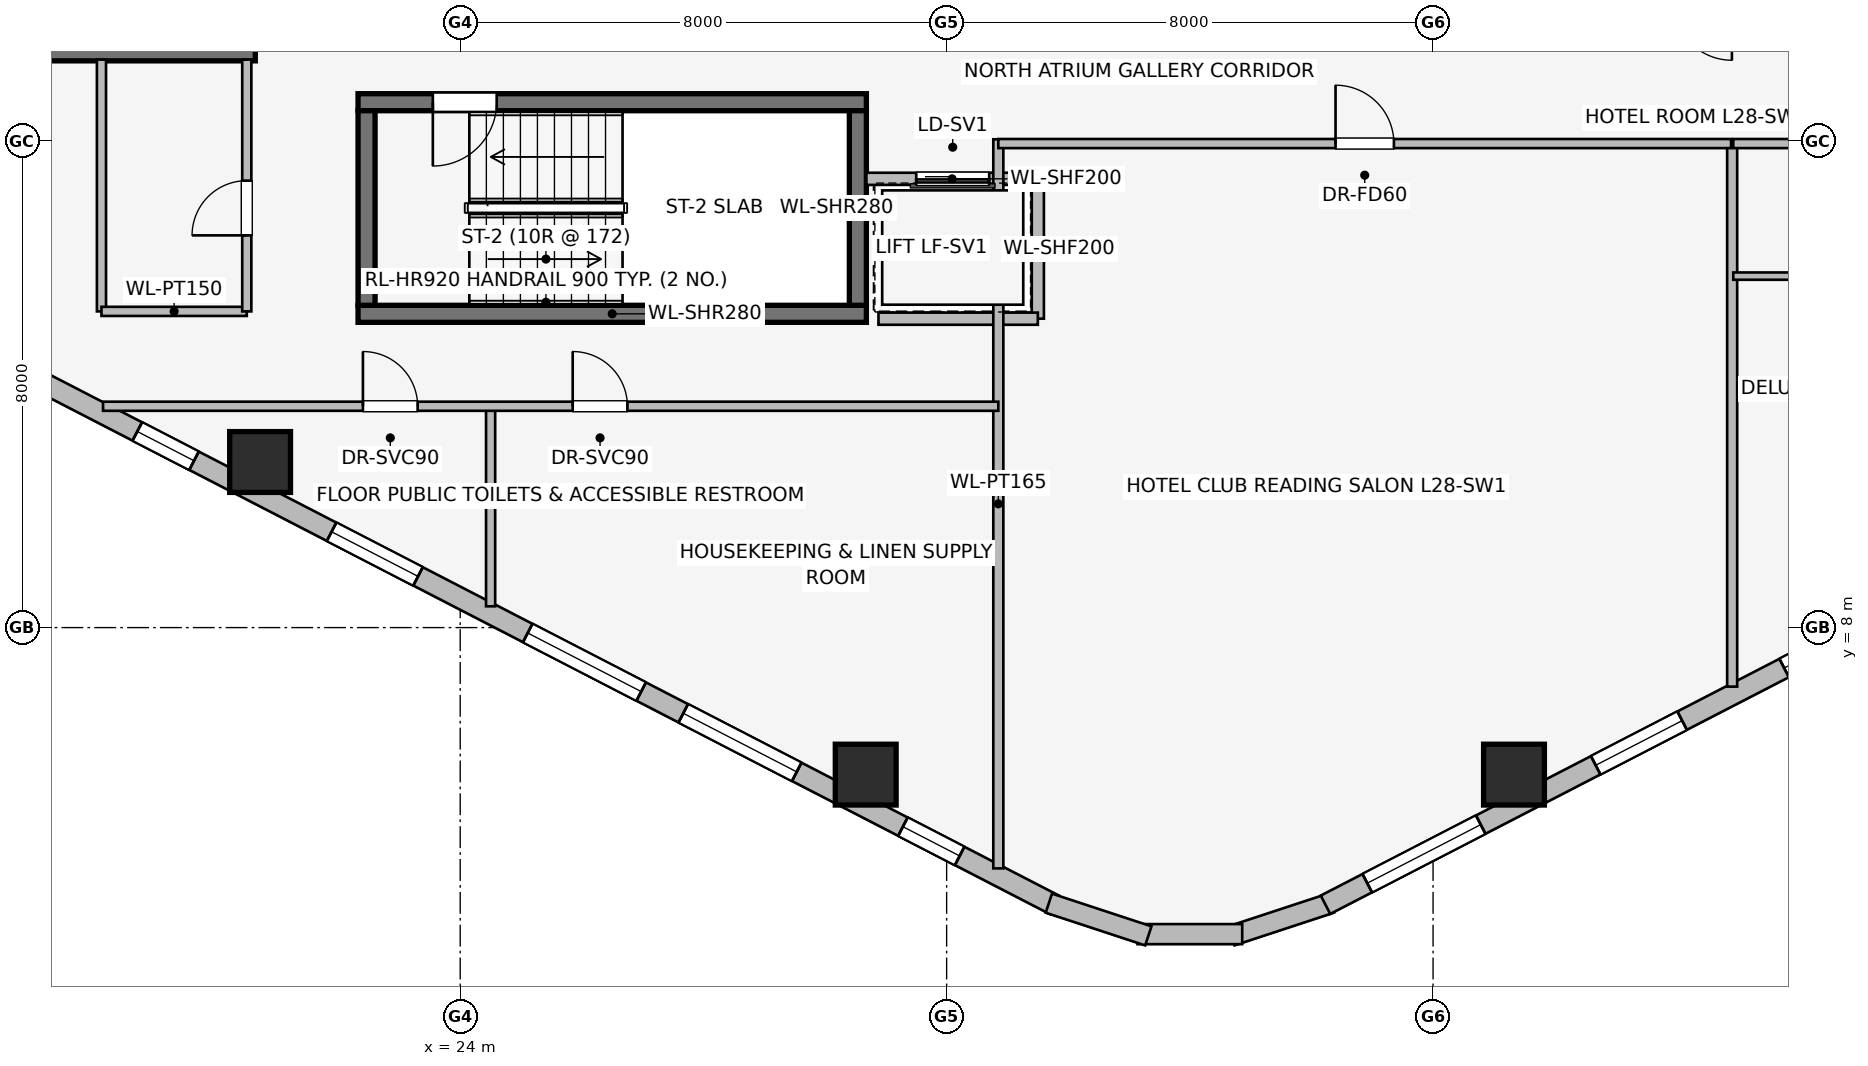
"""IFC4 building model, lengths in metres.
Left out: names, types, materials, properties, quantities, classifications, styles, units other than length and angle.
Written with IfcOpenShell. Run it as: python <this file> out.ifc"""

import sys

from ifc_helpers import new_model, si_unit, direction, frame, frame_2d, origin, origin_2d, place, context, subcontext, project, spatial, rectangle, extrude, element, fill, save


model = new_model("IFC4")
c1 = context("Model", 3, precision=1e-05, world=origin(), true_north=direction((0.0, 1.0)))
c2 = subcontext(c1, "Body", "Model", "MODEL_VIEW")
j1 = project(units=[si_unit("LENGTHUNIT", "METRE"), si_unit("PLANEANGLEUNIT", "RADIAN")], contexts=[c1])
p1 = place(None, origin())
s1 = spatial("IfcSite", under=j1, at=p1, CompositionType="ELEMENT")
p2 = place(p1, origin())
s2 = spatial("IfcBuilding", under=s1, at=p2, CompositionType="ELEMENT")
p3 = place(p2, frame((0.0, 0.0, 108.45)))
s3 = spatial("IfcBuildingStorey", under=s2, at=p3, CompositionType="ELEMENT", Elevation=108.45)
p4 = place(p3, frame((16.87, 17.46, 0.0), z_axis=(0.0, 0.0, 1.0), x_axis=(1.0, 0.0, 0.0)))
e1 = element("IfcWall", 1, at=p4, inside=s3, PredefinedType="SHEAR", context=c2, shape_type="SweptSolid", body=[
    extrude(rectangle(XDim=3.76, YDim=0.28, at=frame_2d((1.88, 0.0))), origin(), (0.0, 0.0, 1.0), 3.45),
])
p5 = place(p3, frame((22.32, 13.16, 0.0), z_axis=(0.0, 0.0, 1.0), x_axis=(1.0, 0.0, 0.0)))
e2 = element("IfcWall", 2, at=p5, inside=s3, PredefinedType="SHEAR", context=c2, shape_type="SweptSolid", body=[
    extrude(rectangle(XDim=8.36, YDim=0.28, at=frame_2d((4.18, 0.0))), origin(), (0.0, 0.0, 1.0), 3.45),
])
p6 = place(p3, frame((30.68, 16.64, 0.0), z_axis=(0.0, 0.0, 1.0), x_axis=(-1.0, 0.0, 0.0)))
e3 = element("IfcWall", 3, at=p6, inside=s3, PredefinedType="SHEAR", context=c2, shape_type="SweptSolid", body=[
    extrude(rectangle(XDim=8.36, YDim=0.28, at=frame_2d((4.18, 0.0))), origin(), (0.0, 0.0, 1.0), 3.45),
])
p7 = place(p6, frame((6.08, 0.0, 0.0)))
e4 = element("IfcOpeningElement", 4, at=p7, cuts=e3, PredefinedType="OPENING", context=c2, shape_type="SweptSolid", body=[
    extrude(rectangle(XDim=1.05, YDim=2.0, at=frame_2d((0.525, 1.0))), frame((0.0, 0.15, 0.0), z_axis=(0.0, -1.0, 0.0), x_axis=(1.0, 0.0, 0.0)), (0.0, 0.0, 1.0), 0.3),
])
for number, where, z_axis, x_axis in (
    (5, (22.46, 16.5, 0.0), (0.0, 0.0, 1.0), (0.0, -1.0, 0.0)),
    (6, (30.54, 13.3, 0.0), (0.0, 0.0, 1.0), (0.0, 1.0, 0.0)),
):
    element("IfcWall", number, at=place(p3, frame(where, z_axis=z_axis, x_axis=x_axis)), inside=s3, PredefinedType="SHEAR", context=c2, shape_type="SweptSolid", body=[
        extrude(rectangle(XDim=3.2, YDim=0.28, at=frame_2d((1.6, 0.0))), origin(), (0.0, 0.0, 1.0), 3.45),
    ])
for number, where, z_axis, x_axis in (
    (7, (20.709, 10.723, 0.0), (0.0, 0.0, 1.0), (1.0, 0.0, 0.0)),
    (8, (30.669, 5.582, 0.0), (0.0, 0.0, 1.0), (1.0, 0.0, 0.0)),
    (9, (41.331, 5.582, 0.0), (0.0, 0.0, 1.0), (1.0, 0.0, 0.0)),
):
    element("IfcColumn", number, at=place(p3, frame(where, z_axis=z_axis, x_axis=x_axis)), inside=s3, PredefinedType="COLUMN", context=c2, shape_type="SweptSolid", body=[
        extrude(rectangle(XDim=1.0, YDim=1.0, at=origin_2d()), origin(), (0.0, 0.0, 1.0), 3.45),
    ])
p8 = place(p3, frame((17.243, 11.95, 0.0), z_axis=(0.0, 0.0, 1.0), x_axis=(-0.790621329885, 0.612305408053, 0.0)))
e10 = element("IfcWall", 10, at=p8, inside=s3, PredefinedType="STANDARD", context=c2, shape_type="SweptSolid", body=[
    extrude(rectangle(XDim=1.676, YDim=0.33, at=frame_2d((0.838, 0.0))), origin(), (0.0, 0.0, 1.0), 3.16),
])
p9 = place(p3, frame((33.769, 3.442, 0.0), z_axis=(0.0, 0.0, 1.0), x_axis=(-0.888613612362, 0.458656568606, 0.0)))
e11 = element("IfcWall", 11, at=p9, inside=s3, PredefinedType="STANDARD", context=c2, shape_type="SweptSolid", body=[
    extrude(rectangle(XDim=18.681, YDim=0.34, at=frame_2d((9.34, 0.0))), origin(), (0.0, 0.0, 1.0), 3.16),
])
p10 = place(p9, frame((1.75, 0.0, 0.75)))
e12 = element("IfcOpeningElement", 12, at=p10, cuts=e11, PredefinedType="OPENING", context=c2, shape_type="SweptSolid", body=[
    extrude(rectangle(XDim=1.05, YDim=1.4, at=frame_2d((0.525, 0.7))), frame((0.0, 0.18, 0.0), z_axis=(0.0, -1.0, 0.0), x_axis=(1.0, 0.0, 0.0)), (0.0, 0.0, 1.0), 0.36),
])
p11 = place(p9, frame((4.765, 0.0, 0.75)))
e13 = element("IfcOpeningElement", 13, at=p11, cuts=e11, PredefinedType="OPENING", context=c2, shape_type="SweptSolid", body=[
    extrude(rectangle(XDim=2.1, YDim=1.5, at=frame_2d((1.05, 0.75))), frame((0.0, 0.18, 0.0), z_axis=(0.0, -1.0, 0.0), x_axis=(1.0, 0.0, 0.0)), (0.0, 0.0, 1.0), 0.36),
])
p12 = place(p9, frame((7.644, 0.0, 0.75)))
e14 = element("IfcOpeningElement", 14, at=p12, cuts=e11, PredefinedType="OPENING", context=c2, shape_type="SweptSolid", body=[
    extrude(rectangle(XDim=2.1, YDim=1.5, at=frame_2d((1.05, 0.75))), frame((0.0, 0.18, 0.0), z_axis=(0.0, -1.0, 0.0), x_axis=(1.0, 0.0, 0.0)), (0.0, 0.0, 1.0), 0.36),
])
p13 = place(p9, frame((11.774, 0.0, 0.75)))
e15 = element("IfcOpeningElement", 15, at=p13, cuts=e11, PredefinedType="OPENING", context=c2, shape_type="SweptSolid", body=[
    extrude(rectangle(XDim=1.6, YDim=1.55, at=frame_2d((0.8, 0.775))), frame((0.0, 0.18, 0.0), z_axis=(0.0, -1.0, 0.0), x_axis=(1.0, 0.0, 0.0)), (0.0, 0.0, 1.0), 0.36),
])
p14 = place(p9, frame((15.92, 0.0, 0.75)))
e16 = element("IfcOpeningElement", 16, at=p14, cuts=e11, PredefinedType="OPENING", context=c2, shape_type="SweptSolid", body=[
    extrude(rectangle(XDim=1.05, YDim=1.4, at=frame_2d((0.525, 0.7))), frame((0.0, 0.18, 0.0), z_axis=(0.0, -1.0, 0.0), x_axis=(1.0, 0.0, 0.0)), (0.0, 0.0, 1.0), 0.36),
])
for number, where, z_axis, x_axis in (
    (17, (38.319, 3.468, 0.0), (0.0, 0.0, 1.0), (-0.95, -0.312, 0.0)),
    (18, (36.861, 2.959, 0.0), (0.0, 0.0, 1.0), (-1.0, 0.0, 0.0)),
    (19, (35.317, 2.93, 0.0), (0.0, 0.0, 1.0), (-0.95, 0.312, 0.0)),
):
    element("IfcWall", number, at=place(p3, frame(where, z_axis=z_axis, x_axis=x_axis)), inside=s3, PredefinedType="STANDARD", context=c2, shape_type="SweptSolid", body=[
        extrude(rectangle(XDim=1.722, YDim=0.33, at=frame_2d((0.861, 0.0))), origin(), (0.0, 0.0, 1.0), 3.16),
    ])
p15 = place(p3, frame((54.831, 12.01, 0.0), z_axis=(0.0, 0.0, 1.0), x_axis=(-0.888613612362, -0.458656568606, 0.0)))
e20 = element("IfcWall", 20, at=p15, inside=s3, PredefinedType="STANDARD", context=c2, shape_type="SweptSolid", body=[
    extrude(rectangle(XDim=18.681, YDim=0.34, at=frame_2d((9.34, 0.0))), origin(), (0.0, 0.0, 1.0), 3.16),
])
p16 = place(p15, frame((1.023, 0.0, 0.75)))
e21 = element("IfcOpeningElement", 21, at=p16, cuts=e20, PredefinedType="OPENING", context=c2, shape_type="SweptSolid", body=[
    extrude(rectangle(XDim=1.6, YDim=1.55, at=frame_2d((0.8, 0.775))), frame((0.0, 0.18, 0.0), z_axis=(0.0, -1.0, 0.0), x_axis=(1.0, 0.0, 0.0)), (0.0, 0.0, 1.0), 0.36),
])
p17 = place(p15, frame((4.914, 0.0, 0.75)))
e22 = element("IfcOpeningElement", 22, at=p17, cuts=e20, PredefinedType="OPENING", context=c2, shape_type="SweptSolid", body=[
    extrude(rectangle(XDim=2.1, YDim=1.5, at=frame_2d((1.05, 0.75))), frame((0.0, 0.18, 0.0), z_axis=(0.0, -1.0, 0.0), x_axis=(1.0, 0.0, 0.0)), (0.0, 0.0, 1.0), 0.36),
])
p18 = place(p15, frame((8.092, 0.0, 0.75)))
e23 = element("IfcOpeningElement", 23, at=p18, cuts=e20, PredefinedType="OPENING", context=c2, shape_type="SweptSolid", body=[
    extrude(rectangle(XDim=2.1, YDim=1.5, at=frame_2d((1.05, 0.75))), frame((0.0, 0.18, 0.0), z_axis=(0.0, -1.0, 0.0), x_axis=(1.0, 0.0, 0.0)), (0.0, 0.0, 1.0), 0.36),
])
p19 = place(p15, frame((12.08, 0.0, 0.75)))
e24 = element("IfcOpeningElement", 24, at=p19, cuts=e20, PredefinedType="OPENING", context=c2, shape_type="SweptSolid", body=[
    extrude(rectangle(XDim=1.6, YDim=1.55, at=frame_2d((0.8, 0.775))), frame((0.0, 0.18, 0.0), z_axis=(0.0, -1.0, 0.0), x_axis=(1.0, 0.0, 0.0)), (0.0, 0.0, 1.0), 0.36),
])
p20 = place(p15, frame((15.808, 0.0, 0.75)))
e25 = element("IfcOpeningElement", 25, at=p20, cuts=e20, PredefinedType="OPENING", context=c2, shape_type="SweptSolid", body=[
    extrude(rectangle(XDim=2.1, YDim=1.5, at=frame_2d((1.05, 0.75))), frame((0.0, 0.18, 0.0), z_axis=(0.0, -1.0, 0.0), x_axis=(1.0, 0.0, 0.0)), (0.0, 0.0, 1.0), 0.36),
])
p21 = place(p3, frame((33.5, 15.38, 0.0), z_axis=(0.0, 0.0, 1.0), x_axis=(-1.0, 0.0, 0.0)))
e26 = element("IfcWall", 26, at=p21, inside=s3, PredefinedType="PARTITIONING", context=c2, shape_type="SweptSolid", body=[
    extrude(rectangle(XDim=2.82, YDim=0.2, at=frame_2d((1.41, 0.0))), origin(), (0.0, 0.0, 1.0), 3.16),
])
p22 = place(p21, frame((0.8, 0.0, 0.0)))
e27 = element("IfcOpeningElement", 27, at=p22, cuts=e26, PredefinedType="OPENING", context=c2, shape_type="SweptSolid", body=[
    extrude(rectangle(XDim=1.2, YDim=2.2, at=frame_2d((0.6, 1.1))), frame((0.0, 0.11, 0.0), z_axis=(0.0, -1.0, 0.0), x_axis=(1.0, 0.0, 0.0)), (0.0, 0.0, 1.0), 0.22),
])
p23 = place(p3, frame((33.5, 13.08, 0.0), z_axis=(0.0, 0.0, 1.0), x_axis=(0.0, 1.0, 0.0)))
e28 = element("IfcWall", 28, at=p23, inside=s3, PredefinedType="PARTITIONING", context=c2, shape_type="SweptSolid", body=[
    extrude(rectangle(XDim=2.3, YDim=0.2, at=frame_2d((1.15, 0.0))), origin(), (0.0, 0.0, 1.0), 3.16),
])
p24 = place(p3, frame((30.879, 13.08, 0.0), z_axis=(0.0, 0.0, 1.0), x_axis=(1.0, 0.0, 0.0)))
e29 = element("IfcWall", 29, at=p24, inside=s3, PredefinedType="PARTITIONING", context=c2, shape_type="SweptSolid", body=[
    extrude(rectangle(XDim=2.621, YDim=0.2, at=frame_2d((1.311, 0.0))), origin(), (0.0, 0.0, 1.0), 3.16),
])
p25 = place(p3, frame((18.1, 17.34, 0.0), z_axis=(0.0, 0.0, 1.0), x_axis=(0.0, -1.0, 0.0)))
e30 = element("IfcWall", 30, at=p25, inside=s3, PredefinedType="PARTITIONING", context=c2, shape_type="SweptSolid", body=[
    extrude(rectangle(XDim=4.14, YDim=0.15, at=frame_2d((2.07, 0.0))), origin(), (0.0, 0.0, 1.0), 3.16),
])
p26 = place(p3, frame((18.1, 13.2, 0.0), z_axis=(0.0, 0.0, 1.0), x_axis=(1.0, 0.0, 0.0)))
e31 = element("IfcWall", 31, at=p26, inside=s3, PredefinedType="PARTITIONING", context=c2, shape_type="SweptSolid", body=[
    extrude(rectangle(XDim=2.39, YDim=0.15, at=frame_2d((1.195, 0.0))), origin(), (0.0, 0.0, 1.0), 3.16),
])
p27 = place(p3, frame((20.49, 13.2, 0.0), z_axis=(0.0, 0.0, 1.0), x_axis=(0.0, 1.0, 0.0)))
e32 = element("IfcWall", 32, at=p27, inside=s3, PredefinedType="PARTITIONING", context=c2, shape_type="SweptSolid", body=[
    extrude(rectangle(XDim=4.14, YDim=0.15, at=frame_2d((2.07, 0.0))), origin(), (0.0, 0.0, 1.0), 3.16),
])
p28 = place(p27, frame((1.25, 0.0, 0.0)))
e33 = element("IfcOpeningElement", 33, at=p28, cuts=e32, PredefinedType="OPENING", context=c2, shape_type="SweptSolid", body=[
    extrude(rectangle(XDim=0.9, YDim=2.0, at=frame_2d((0.45, 1.0))), frame((0.0, 0.085, 0.0), z_axis=(0.0, -1.0, 0.0), x_axis=(1.0, 0.0, 0.0)), (0.0, 0.0, 1.0), 0.17),
])
p29 = place(p3, frame((32.85, 4.04, 0.0), z_axis=(0.0, 0.0, 1.0), x_axis=(0.0, 1.0, 0.0)))
e34 = element("IfcWall", 34, at=p29, inside=s3, PredefinedType="PARTITIONING", context=c2, shape_type="SweptSolid", body=[
    extrude(rectangle(XDim=11.99, YDim=0.165, at=frame_2d((5.995, 0.0))), origin(), (0.0, 0.0, 1.0), 3.16),
])
p30 = place(p3, frame((24.5, 8.35, 0.0), z_axis=(0.0, 0.0, 1.0), x_axis=(0.0, 1.0, 0.0)))
e35 = element("IfcWall", 35, at=p30, inside=s3, PredefinedType="PARTITIONING", context=c2, shape_type="SweptSolid", body=[
    extrude(rectangle(XDim=3.29, YDim=0.15, at=frame_2d((1.645, 0.0))), origin(), (0.0, 0.0, 1.0), 3.16),
])
p31 = place(p3, frame((18.126, 11.64, 0.0), z_axis=(0.0, 0.0, 1.0), x_axis=(1.0, 0.0, 0.0)))
e36 = element("IfcWall", 36, at=p31, inside=s3, PredefinedType="PARTITIONING", context=c2, shape_type="SweptSolid", body=[
    extrude(rectangle(XDim=14.724, YDim=0.15, at=frame_2d((7.362, 0.0))), origin(), (0.0, 0.0, 1.0), 3.16),
])
p32 = place(p31, frame((4.274, 0.0, 0.0)))
e37 = element("IfcOpeningElement", 37, at=p32, cuts=e36, PredefinedType="OPENING", context=c2, shape_type="SweptSolid", body=[
    extrude(rectangle(XDim=0.9, YDim=2.0, at=frame_2d((0.45, 1.0))), frame((0.0, 0.085, 0.0), z_axis=(0.0, -1.0, 0.0), x_axis=(1.0, 0.0, 0.0)), (0.0, 0.0, 1.0), 0.17),
])
p33 = place(p31, frame((7.724, 0.0, 0.0)))
e38 = element("IfcOpeningElement", 38, at=p33, cuts=e36, PredefinedType="OPENING", context=c2, shape_type="SweptSolid", body=[
    extrude(rectangle(XDim=0.9, YDim=2.0, at=frame_2d((0.45, 1.0))), frame((0.0, 0.085, 0.0), z_axis=(0.0, -1.0, 0.0), x_axis=(1.0, 0.0, 0.0)), (0.0, 0.0, 1.0), 0.17),
])
p34 = place(p3, frame((44.919, 7.029, 0.0), z_axis=(0.0, 0.0, 1.0), x_axis=(0.0, 1.0, 0.0)))
e39 = element("IfcWall", 39, at=p34, inside=s3, PredefinedType="PARTITIONING", context=c2, shape_type="SweptSolid", body=[
    extrude(rectangle(XDim=8.901, YDim=0.165, at=frame_2d((4.45, 0.0))), origin(), (0.0, 0.0, 1.0), 3.16),
])
p35 = place(p3, frame((32.85, 15.96, 0.0), z_axis=(0.0, 0.0, 1.0), x_axis=(1.0, 0.0, 0.0)))
e40 = element("IfcWall", 40, at=p35, inside=s3, PredefinedType="PARTITIONING", context=c2, shape_type="SweptSolid", body=[
    extrude(rectangle(XDim=12.051, YDim=0.15, at=frame_2d((6.025, 0.0))), origin(), (0.0, 0.0, 1.0), 3.16),
])
p36 = place(p35, frame((5.546, 0.0, 0.0)))
e41 = element("IfcOpeningElement", 41, at=p36, cuts=e40, PredefinedType="OPENING", context=c2, shape_type="SweptSolid", body=[
    extrude(rectangle(XDim=0.96, YDim=2.0, at=frame_2d((0.48, 1.0))), frame((0.0, 0.085, 0.0), z_axis=(0.0, -1.0, 0.0), x_axis=(1.0, 0.0, 0.0)), (0.0, 0.0, 1.0), 0.17),
])
p37 = place(p3, frame((44.937, 13.78, 0.0), z_axis=(0.0, 0.0, 1.0), x_axis=(1.0, 0.0, 0.0)))
e42 = element("IfcWall", 42, at=p37, inside=s3, PredefinedType="PARTITIONING", context=c2, shape_type="SweptSolid", body=[
    extrude(rectangle(XDim=2.32, YDim=0.12, at=frame_2d((1.16, 0.0))), origin(), (0.0, 0.0, 1.0), 3.16),
])
p38 = place(p3, frame((44.937, 15.96, 0.0), z_axis=(0.0, 0.0, 1.0), x_axis=(1.0, 0.0, 0.0)))
e43 = element("IfcWall", 43, at=p38, inside=s3, PredefinedType="PARTITIONING", context=c2, shape_type="SweptSolid", body=[
    extrude(rectangle(XDim=12.271, YDim=0.15, at=frame_2d((6.135, 0.0))), origin(), (0.0, 0.0, 1.0), 3.16),
])
p39 = place(p38, frame((6.769, 0.0, 0.0)))
e44 = element("IfcOpeningElement", 44, at=p39, cuts=e43, PredefinedType="OPENING", context=c2, shape_type="SweptSolid", body=[
    extrude(rectangle(XDim=0.96, YDim=2.0, at=frame_2d((0.48, 1.0))), frame((0.0, 0.085, 0.0), z_axis=(0.0, -1.0, 0.0), x_axis=(1.0, 0.0, 0.0)), (0.0, 0.0, 1.0), 0.17),
])
p40 = place(p10, origin())
e45 = element("IfcWindow", 45, at=p40, inside=s3, PartitioningType="SINGLE_PANEL", PredefinedType="WINDOW", context=c2, shape_type="SweptSolid", body=[
    extrude(rectangle(XDim=1.05, YDim=1.4, at=frame_2d((0.525, 0.7))), frame((0.0, 0.03, 0.0), z_axis=(0.0, -1.0, 0.0), x_axis=(1.0, 0.0, 0.0)), (0.0, 0.0, 1.0), 0.06),
])
fill(e12, e45)
p41 = place(p11, origin())
e46 = element("IfcWindow", 46, at=p41, inside=s3, PartitioningType="SINGLE_PANEL", PredefinedType="WINDOW", context=c2, shape_type="SweptSolid", body=[
    extrude(rectangle(XDim=2.1, YDim=1.5, at=frame_2d((1.05, 0.75))), frame((0.0, 0.03, 0.0), z_axis=(0.0, -1.0, 0.0), x_axis=(1.0, 0.0, 0.0)), (0.0, 0.0, 1.0), 0.06),
])
fill(e13, e46)
p42 = place(p12, origin())
e47 = element("IfcWindow", 47, at=p42, inside=s3, PartitioningType="SINGLE_PANEL", PredefinedType="WINDOW", context=c2, shape_type="SweptSolid", body=[
    extrude(rectangle(XDim=2.1, YDim=1.5, at=frame_2d((1.05, 0.75))), frame((0.0, 0.03, 0.0), z_axis=(0.0, -1.0, 0.0), x_axis=(1.0, 0.0, 0.0)), (0.0, 0.0, 1.0), 0.06),
])
fill(e14, e47)
p43 = place(p13, origin())
e48 = element("IfcWindow", 48, at=p43, inside=s3, PartitioningType="SINGLE_PANEL", PredefinedType="WINDOW", context=c2, shape_type="SweptSolid", body=[
    extrude(rectangle(XDim=1.6, YDim=1.55, at=frame_2d((0.8, 0.775))), frame((0.0, 0.03, 0.0), z_axis=(0.0, -1.0, 0.0), x_axis=(1.0, 0.0, 0.0)), (0.0, 0.0, 1.0), 0.06),
])
fill(e15, e48)
p44 = place(p14, origin())
e49 = element("IfcWindow", 49, at=p44, inside=s3, PartitioningType="SINGLE_PANEL", PredefinedType="WINDOW", context=c2, shape_type="SweptSolid", body=[
    extrude(rectangle(XDim=1.05, YDim=1.4, at=frame_2d((0.525, 0.7))), frame((0.0, 0.03, 0.0), z_axis=(0.0, -1.0, 0.0), x_axis=(1.0, 0.0, 0.0)), (0.0, 0.0, 1.0), 0.06),
])
fill(e16, e49)
p45 = place(p18, origin())
e50 = element("IfcWindow", 50, at=p45, inside=s3, PartitioningType="SINGLE_PANEL", PredefinedType="WINDOW", context=c2, shape_type="SweptSolid", body=[
    extrude(rectangle(XDim=2.1, YDim=1.5, at=frame_2d((1.05, 0.75))), frame((0.0, 0.03, 0.0), z_axis=(0.0, -1.0, 0.0), x_axis=(1.0, 0.0, 0.0)), (0.0, 0.0, 1.0), 0.06),
])
fill(e23, e50)
p46 = place(p19, origin())
e51 = element("IfcWindow", 51, at=p46, inside=s3, PartitioningType="SINGLE_PANEL", PredefinedType="WINDOW", context=c2, shape_type="SweptSolid", body=[
    extrude(rectangle(XDim=1.6, YDim=1.55, at=frame_2d((0.8, 0.775))), frame((0.0, 0.03, 0.0), z_axis=(0.0, -1.0, 0.0), x_axis=(1.0, 0.0, 0.0)), (0.0, 0.0, 1.0), 0.06),
])
fill(e24, e51)
p47 = place(p20, origin())
e52 = element("IfcWindow", 52, at=p47, inside=s3, PartitioningType="SINGLE_PANEL", PredefinedType="WINDOW", context=c2, shape_type="SweptSolid", body=[
    extrude(rectangle(XDim=2.1, YDim=1.5, at=frame_2d((1.05, 0.75))), frame((0.0, 0.03, 0.0), z_axis=(0.0, -1.0, 0.0), x_axis=(1.0, 0.0, 0.0)), (0.0, 0.0, 1.0), 0.06),
])
fill(e25, e52)
p48 = place(p7, origin())
e53 = element("IfcDoor", 53, at=p48, inside=s3, OperationType="SINGLE_SWING_RIGHT", PredefinedType="DOOR", context=c2, shape_type="SweptSolid", body=[
    extrude(rectangle(XDim=1.05, YDim=2.0, at=frame_2d((0.525, 1.0))), frame((0.0, 0.025, 0.0), z_axis=(0.0, -1.0, 0.0), x_axis=(1.0, 0.0, 0.0)), (0.0, 0.0, 1.0), 0.05),
])
fill(e4, e53)
p49 = place(p22, origin())
e54 = element("IfcDoor", 54, at=p49, inside=s3, OperationType="SLIDING_TO_RIGHT", PredefinedType="DOOR", context=c2, shape_type="SweptSolid", body=[
    extrude(rectangle(XDim=1.2, YDim=2.2, at=frame_2d((0.6, 1.1))), frame((0.0, 0.025, 0.0), z_axis=(0.0, -1.0, 0.0), x_axis=(1.0, 0.0, 0.0)), (0.0, 0.0, 1.0), 0.05),
])
fill(e27, e54)
p50 = place(p28, origin())
e55 = element("IfcDoor", 55, at=p50, inside=s3, OperationType="SINGLE_SWING_LEFT", PredefinedType="DOOR", context=c2, shape_type="SweptSolid", body=[
    extrude(rectangle(XDim=0.9, YDim=2.0, at=frame_2d((0.45, 1.0))), frame((0.0, 0.025, 0.0), z_axis=(0.0, -1.0, 0.0), x_axis=(1.0, 0.0, 0.0)), (0.0, 0.0, 1.0), 0.05),
])
fill(e33, e55)
p51 = place(p32, origin())
e56 = element("IfcDoor", 56, at=p51, inside=s3, OperationType="SINGLE_SWING_LEFT", PredefinedType="DOOR", context=c2, shape_type="SweptSolid", body=[
    extrude(rectangle(XDim=0.9, YDim=2.0, at=frame_2d((0.45, 1.0))), frame((0.0, 0.025, 0.0), z_axis=(0.0, -1.0, 0.0), x_axis=(1.0, 0.0, 0.0)), (0.0, 0.0, 1.0), 0.05),
])
fill(e37, e56)
p52 = place(p33, origin())
e57 = element("IfcDoor", 57, at=p52, inside=s3, OperationType="SINGLE_SWING_LEFT", PredefinedType="DOOR", context=c2, shape_type="SweptSolid", body=[
    extrude(rectangle(XDim=0.9, YDim=2.0, at=frame_2d((0.45, 1.0))), frame((0.0, 0.025, 0.0), z_axis=(0.0, -1.0, 0.0), x_axis=(1.0, 0.0, 0.0)), (0.0, 0.0, 1.0), 0.05),
])
fill(e38, e57)
p53 = place(p36, origin())
e58 = element("IfcDoor", 58, at=p53, inside=s3, OperationType="SINGLE_SWING_LEFT", PredefinedType="DOOR", context=c2, shape_type="SweptSolid", body=[
    extrude(rectangle(XDim=0.96, YDim=2.0, at=frame_2d((0.48, 1.0))), frame((0.0, 0.025, 0.0), z_axis=(0.0, -1.0, 0.0), x_axis=(1.0, 0.0, 0.0)), (0.0, 0.0, 1.0), 0.05),
])
fill(e41, e58)
save(model, sys.argv[1])
